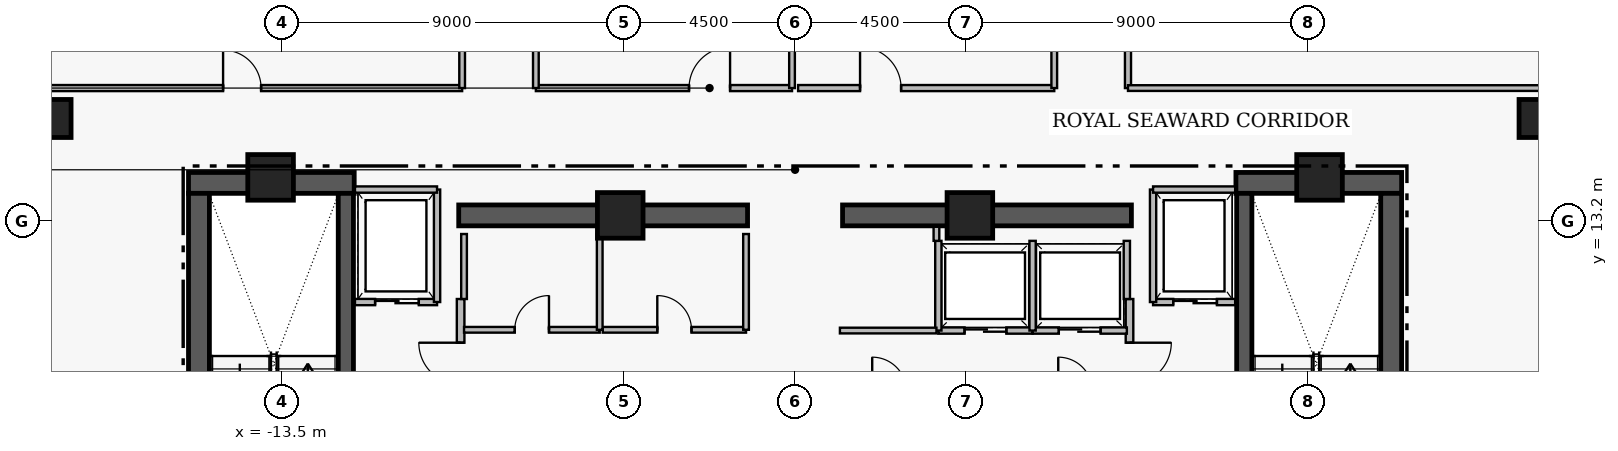
"""IFC4 building model, lengths in metres.
Left out: names, types, materials, properties, quantities, classifications, styles, units other than length and angle.
Written with IfcOpenShell. Run it as: python <this file> out.ifc"""

import sys

from ifc_helpers import new_model, si_unit, direction, frame, frame_2d, origin, origin_2d, place, context, subcontext, project, spatial, rectangle, extrude, element, fill, save


model = new_model("IFC4")
c1 = context("Model", 3, precision=1e-05, world=origin(), true_north=direction((0.0, 1.0)))
c2 = subcontext(c1, "Body", "Model", "MODEL_VIEW")
j1 = project(units=[si_unit("LENGTHUNIT", "METRE"), si_unit("PLANEANGLEUNIT", "RADIAN")], contexts=[c1])
p1 = place(None, origin())
s1 = spatial("IfcSite", under=j1, at=p1, CompositionType="ELEMENT")
p2 = place(p1, origin())
s2 = spatial("IfcBuilding", under=s1, at=p2, CompositionType="ELEMENT")
p3 = place(p2, frame((0.0, 0.0, 254.45)))
s3 = spatial("IfcBuildingStorey", under=s2, at=p3, CompositionType="ELEMENT", Elevation=254.45)
for number, where, z_axis, x_axis in (
    (1, (-15.96, 14.205, 0.0), (0.0, 0.0, 1.0), (1.0, 0.0, 0.0)),
    (2, (11.6, 14.205, 0.0), (0.0, 0.0, 1.0), (1.0, 0.0, 0.0)),
):
    element("IfcWall", number, at=place(p3, frame(where, z_axis=z_axis, x_axis=x_axis)), inside=s3, PredefinedType="SHEAR", context=c2, shape_type="SweptSolid", body=[
        extrude(rectangle(XDim=4.36, YDim=0.55, at=frame_2d((2.18, 0.0))), origin(), (0.0, 0.0, 1.0), 3.51),
    ])
for number, where, z_axis, x_axis in (
    (3, (-15.685, 4.97, 0.0), (0.0, 0.0, 1.0), (0.0, 1.0, 0.0)),
    (4, (15.685, 4.97, 0.0), (0.0, 0.0, 1.0), (0.0, 1.0, 0.0)),
):
    element("IfcWall", number, at=place(p3, frame(where, z_axis=z_axis, x_axis=x_axis)), inside=s3, PredefinedType="SHEAR", context=c2, shape_type="SweptSolid", body=[
        extrude(rectangle(XDim=8.96, YDim=0.55, at=frame_2d((4.48, 0.0))), origin(), (0.0, 0.0, 1.0), 3.51),
    ])
for number, where, z_axis, x_axis in (
    (5, (-8.85, 13.35, 0.0), (0.0, 0.0, 1.0), (1.0, 0.0, 0.0)),
    (6, (1.25, 13.35, 0.0), (0.0, 0.0, 1.0), (1.0, 0.0, 0.0)),
):
    element("IfcWall", number, at=place(p3, frame(where, z_axis=z_axis, x_axis=x_axis)), inside=s3, PredefinedType="SHEAR", context=c2, shape_type="SweptSolid", body=[
        extrude(rectangle(XDim=7.6, YDim=0.55, at=frame_2d((3.8, 0.0))), origin(), (0.0, 0.0, 1.0), 3.48),
    ])
p4 = place(p3, frame((-11.82, 4.97, 0.0), z_axis=(0.0, 0.0, 1.0), x_axis=(0.0, 1.0, 0.0)))
e7 = element("IfcWall", 7, at=p4, inside=s3, PredefinedType="SHEAR", context=c2, shape_type="SweptSolid", body=[
    extrude(rectangle(XDim=8.96, YDim=0.4, at=frame_2d((4.48, 0.0))), origin(), (0.0, 0.0, 1.0), 3.51),
])
p5 = place(p4, frame((0.31, 0.0, 0.0)))
e8 = element("IfcOpeningElement", 8, at=p5, cuts=e7, PredefinedType="OPENING", context=c2, shape_type="SweptSolid", body=[
    extrude(rectangle(XDim=1.12, YDim=2.22, at=frame_2d((0.56, 1.11))), frame((0.0, 0.21, 0.0), z_axis=(0.0, -1.0, 0.0), x_axis=(1.0, 0.0, 0.0)), (0.0, 0.0, 1.0), 0.42),
])
p6 = place(p3, frame((11.82, 13.93, 0.0), z_axis=(0.0, 0.0, 1.0), x_axis=(0.0, -1.0, 0.0)))
e9 = element("IfcWall", 9, at=p6, inside=s3, PredefinedType="SHEAR", context=c2, shape_type="SweptSolid", body=[
    extrude(rectangle(XDim=8.96, YDim=0.4, at=frame_2d((4.48, 0.0))), origin(), (0.0, 0.0, 1.0), 3.51),
])
p7 = place(p6, frame((7.53, 0.0, 0.0)))
e10 = element("IfcOpeningElement", 10, at=p7, cuts=e9, PredefinedType="OPENING", context=c2, shape_type="SweptSolid", body=[
    extrude(rectangle(XDim=1.12, YDim=2.22, at=frame_2d((0.56, 1.11))), frame((0.0, 0.21, 0.0), z_axis=(0.0, -1.0, 0.0), x_axis=(1.0, 0.0, 0.0)), (0.0, 0.0, 1.0), 0.42),
])
for number, where, z_axis, x_axis in (
    (11, (-13.8, 14.35, 0.0), (0.0, 0.0, 1.0), (1.0, 0.0, 0.0)),
    (12, (-4.6, 13.35, 0.0), (0.0, 0.0, 1.0), (1.0, 0.0, 0.0)),
    (13, (4.6, 13.35, 0.0), (0.0, 0.0, 1.0), (1.0, 0.0, 0.0)),
    (14, (13.8, 14.35, 0.0), (0.0, 0.0, 1.0), (1.0, 0.0, 0.0)),
):
    element("IfcColumn", number, at=place(p3, frame(where, z_axis=z_axis, x_axis=x_axis)), inside=s3, PredefinedType="COLUMN", context=c2, shape_type="SweptSolid", body=[
        extrude(rectangle(XDim=1.2, YDim=1.2, at=origin_2d()), origin(), (0.0, 0.0, 1.0), 3.7),
    ])
for number, where, z_axis, x_axis in (
    (15, (-19.55, 15.9, 0.0), (0.0, 0.0, 1.0), (1.0, 0.0, 0.0)),
    (16, (19.55, 15.9, 0.0), (0.0, 0.0, 1.0), (1.0, 0.0, 0.0)),
):
    element("IfcColumn", number, at=place(p3, frame(where, z_axis=z_axis, x_axis=x_axis)), inside=s3, PredefinedType="COLUMN", context=c2, shape_type="SweptSolid", body=[
        extrude(rectangle(XDim=1.0, YDim=1.0, at=origin_2d()), origin(), (0.0, 0.0, 1.0), 3.7),
    ])
p8 = place(p3, frame((-8.8, 5.05, 0.0), z_axis=(0.0, 0.0, 1.0), x_axis=(0.0, 1.0, 0.0)))
e17 = element("IfcWall", 17, at=p8, inside=s3, PredefinedType="PARTITIONING", context=c2, shape_type="SweptSolid", body=[
    extrude(rectangle(XDim=6.1, YDim=0.2, at=frame_2d((3.05, 0.0))), origin(), (0.0, 0.0, 1.0), 3.48),
])
p9 = place(p8, frame((0.25, 0.0, 0.0)))
e18 = element("IfcOpeningElement", 18, at=p9, cuts=e17, PredefinedType="OPENING", context=c2, shape_type="SweptSolid", body=[
    extrude(rectangle(XDim=1.1, YDim=2.2, at=frame_2d((0.55, 1.1))), frame((0.0, 0.11, 0.0), z_axis=(0.0, -1.0, 0.0), x_axis=(1.0, 0.0, 0.0)), (0.0, 0.0, 1.0), 0.22),
])
p10 = place(p8, frame((3.85, 0.0, 0.0)))
e19 = element("IfcOpeningElement", 19, at=p10, cuts=e17, PredefinedType="OPENING", context=c2, shape_type="SweptSolid", body=[
    extrude(rectangle(XDim=1.1, YDim=2.2, at=frame_2d((0.55, 1.1))), frame((0.0, 0.11, 0.0), z_axis=(0.0, -1.0, 0.0), x_axis=(1.0, 0.0, 0.0)), (0.0, 0.0, 1.0), 0.22),
])
p11 = place(p3, frame((8.8, 11.15, 0.0), z_axis=(0.0, 0.0, 1.0), x_axis=(0.0, -1.0, 0.0)))
e20 = element("IfcWall", 20, at=p11, inside=s3, PredefinedType="PARTITIONING", context=c2, shape_type="SweptSolid", body=[
    extrude(rectangle(XDim=6.1, YDim=0.2, at=frame_2d((3.05, 0.0))), origin(), (0.0, 0.0, 1.0), 3.48),
])
p12 = place(p11, frame((1.15, 0.0, 0.0)))
e21 = element("IfcOpeningElement", 21, at=p12, cuts=e20, PredefinedType="OPENING", context=c2, shape_type="SweptSolid", body=[
    extrude(rectangle(XDim=1.1, YDim=2.2, at=frame_2d((0.55, 1.1))), frame((0.0, 0.11, 0.0), z_axis=(0.0, -1.0, 0.0), x_axis=(1.0, 0.0, 0.0)), (0.0, 0.0, 1.0), 0.22),
])
p13 = place(p11, frame((4.75, 0.0, 0.0)))
e22 = element("IfcOpeningElement", 22, at=p13, cuts=e20, PredefinedType="OPENING", context=c2, shape_type="SweptSolid", body=[
    extrude(rectangle(XDim=1.1, YDim=2.2, at=frame_2d((0.55, 1.1))), frame((0.0, 0.11, 0.0), z_axis=(0.0, -1.0, 0.0), x_axis=(1.0, 0.0, 0.0)), (0.0, 0.0, 1.0), 0.22),
])
p14 = place(p3, frame((-11.58, 11.07, 0.0), z_axis=(0.0, 0.0, 1.0), x_axis=(1.0, 0.0, 0.0)))
e23 = element("IfcWall", 23, at=p14, inside=s3, PredefinedType="PARTITIONING", context=c2, shape_type="SweptSolid", body=[
    extrude(rectangle(XDim=2.16, YDim=0.165, at=frame_2d((1.08, 0.0))), origin(), (0.0, 0.0, 1.0), 3.48),
])
p15 = place(p14, frame((0.53, 0.0, 0.0)))
e24 = element("IfcOpeningElement", 24, at=p15, cuts=e23, PredefinedType="OPENING", context=c2, shape_type="SweptSolid", body=[
    extrude(rectangle(XDim=1.15, YDim=2.25, at=frame_2d((0.575, 1.125))), frame((0.0, 0.093, 0.0), z_axis=(0.0, -1.0, 0.0), x_axis=(1.0, 0.0, 0.0)), (0.0, 0.0, 1.0), 0.185),
])
p16 = place(p3, frame((9.42, 11.07, 0.0), z_axis=(0.0, 0.0, 1.0), x_axis=(1.0, 0.0, 0.0)))
e25 = element("IfcWall", 25, at=p16, inside=s3, PredefinedType="PARTITIONING", context=c2, shape_type="SweptSolid", body=[
    extrude(rectangle(XDim=2.16, YDim=0.165, at=frame_2d((1.08, 0.0))), origin(), (0.0, 0.0, 1.0), 3.48),
])
p17 = place(p16, frame((0.53, 0.0, 0.0)))
e26 = element("IfcOpeningElement", 26, at=p17, cuts=e25, PredefinedType="OPENING", context=c2, shape_type="SweptSolid", body=[
    extrude(rectangle(XDim=1.15, YDim=2.25, at=frame_2d((0.575, 1.125))), frame((0.0, 0.093, 0.0), z_axis=(0.0, -1.0, 0.0), x_axis=(1.0, 0.0, 0.0)), (0.0, 0.0, 1.0), 0.185),
])
p18 = place(p3, frame((3.77, 10.32, 0.0), z_axis=(0.0, 0.0, 1.0), x_axis=(1.0, 0.0, 0.0)))
e27 = element("IfcWall", 27, at=p18, inside=s3, PredefinedType="PARTITIONING", context=c2, shape_type="SweptSolid", body=[
    extrude(rectangle(XDim=2.48, YDim=0.165, at=frame_2d((1.24, 0.0))), origin(), (0.0, 0.0, 1.0), 3.48),
])
p19 = place(p18, frame((0.69, 0.0, 0.0)))
e28 = element("IfcOpeningElement", 28, at=p19, cuts=e27, PredefinedType="OPENING", context=c2, shape_type="SweptSolid", body=[
    extrude(rectangle(XDim=1.1, YDim=2.25, at=frame_2d((0.55, 1.125))), frame((0.0, 0.093, 0.0), z_axis=(0.0, -1.0, 0.0), x_axis=(1.0, 0.0, 0.0)), (0.0, 0.0, 1.0), 0.185),
])
p20 = place(p3, frame((6.25, 10.32, 0.0), z_axis=(0.0, 0.0, 1.0), x_axis=(1.0, 0.0, 0.0)))
e29 = element("IfcWall", 29, at=p20, inside=s3, PredefinedType="PARTITIONING", context=c2, shape_type="SweptSolid", body=[
    extrude(rectangle(XDim=2.48, YDim=0.165, at=frame_2d((1.24, 0.0))), origin(), (0.0, 0.0, 1.0), 3.48),
])
p21 = place(p20, frame((0.69, 0.0, 0.0)))
e30 = element("IfcOpeningElement", 30, at=p21, cuts=e29, PredefinedType="OPENING", context=c2, shape_type="SweptSolid", body=[
    extrude(rectangle(XDim=1.1, YDim=2.25, at=frame_2d((0.55, 1.125))), frame((0.0, 0.093, 0.0), z_axis=(0.0, -1.0, 0.0), x_axis=(1.0, 0.0, 0.0)), (0.0, 0.0, 1.0), 0.185),
])
p22 = place(p3, frame((-8.71, 10.34, 0.0), z_axis=(0.0, 0.0, 1.0), x_axis=(1.0, 0.0, 0.0)))
e31 = element("IfcWall", 31, at=p22, inside=s3, PredefinedType="PARTITIONING", context=c2, shape_type="SweptSolid", body=[
    extrude(rectangle(XDim=3.57, YDim=0.15, at=frame_2d((1.785, 0.0))), origin(), (0.0, 0.0, 1.0), 3.48),
])
p23 = place(p22, frame((1.335, 0.0, 0.0)))
e32 = element("IfcOpeningElement", 32, at=p23, cuts=e31, PredefinedType="OPENING", context=c2, shape_type="SweptSolid", body=[
    extrude(rectangle(XDim=0.9, YDim=2.15, at=frame_2d((0.45, 1.075))), frame((0.0, 0.085, 0.0), z_axis=(0.0, -1.0, 0.0), x_axis=(1.0, 0.0, 0.0)), (0.0, 0.0, 1.0), 0.17),
])
p24 = place(p3, frame((-5.06, 10.34, 0.0), z_axis=(0.0, 0.0, 1.0), x_axis=(1.0, 0.0, 0.0)))
e33 = element("IfcWall", 33, at=p24, inside=s3, PredefinedType="PARTITIONING", context=c2, shape_type="SweptSolid", body=[
    extrude(rectangle(XDim=3.77, YDim=0.15, at=frame_2d((1.885, 0.0))), origin(), (0.0, 0.0, 1.0), 3.48),
])
p25 = place(p24, frame((1.435, 0.0, 0.0)))
e34 = element("IfcOpeningElement", 34, at=p25, cuts=e33, PredefinedType="OPENING", context=c2, shape_type="SweptSolid", body=[
    extrude(rectangle(XDim=0.9, YDim=2.15, at=frame_2d((0.45, 1.075))), frame((0.0, 0.085, 0.0), z_axis=(0.0, -1.0, 0.0), x_axis=(1.0, 0.0, 0.0)), (0.0, 0.0, 1.0), 0.17),
])
p26 = place(p3, frame((-6.82, 16.7, 0.0), z_axis=(0.0, 0.0, 1.0), x_axis=(1.0, 0.0, 0.0)))
e35 = element("IfcWall", 35, at=p26, inside=s3, PredefinedType="PARTITIONING", context=c2, shape_type="SweptSolid", body=[
    extrude(rectangle(XDim=6.74, YDim=0.16, at=frame_2d((3.37, 0.0))), origin(), (0.0, 0.0, 1.0), 3.076),
])
p27 = place(p26, frame((4.03, 0.0, 0.0)))
e36 = element("IfcOpeningElement", 36, at=p27, cuts=e35, PredefinedType="OPENING", context=c2, shape_type="SweptSolid", body=[
    extrude(rectangle(XDim=1.08, YDim=2.18, at=frame_2d((0.54, 1.09))), frame((0.0, 0.09, 0.0), z_axis=(0.0, -1.0, 0.0), x_axis=(1.0, 0.0, 0.0)), (0.0, 0.0, 1.0), 0.18),
])
p28 = place(p3, frame((0.08, 16.7, 0.0), z_axis=(0.0, 0.0, 1.0), x_axis=(1.0, 0.0, 0.0)))
e37 = element("IfcWall", 37, at=p28, inside=s3, PredefinedType="PARTITIONING", context=c2, shape_type="SweptSolid", body=[
    extrude(rectangle(XDim=6.74, YDim=0.16, at=frame_2d((3.37, 0.0))), origin(), (0.0, 0.0, 1.0), 3.076),
])
p29 = place(p28, frame((1.63, 0.0, 0.0)))
e38 = element("IfcOpeningElement", 38, at=p29, cuts=e37, PredefinedType="OPENING", context=c2, shape_type="SweptSolid", body=[
    extrude(rectangle(XDim=1.08, YDim=2.18, at=frame_2d((0.54, 1.09))), frame((0.0, 0.09, 0.0), z_axis=(0.0, -1.0, 0.0), x_axis=(1.0, 0.0, 0.0)), (0.0, 0.0, 1.0), 0.18),
])
p30 = place(p3, frame((-22.64, 16.7, 0.0), z_axis=(0.0, 0.0, 1.0), x_axis=(1.0, 0.0, 0.0)))
e39 = element("IfcWall", 39, at=p30, inside=s3, PredefinedType="PARTITIONING", context=c2, shape_type="SweptSolid", body=[
    extrude(rectangle(XDim=13.88, YDim=0.16, at=frame_2d((6.94, 0.0))), origin(), (0.0, 0.0, 1.0), 3.076),
])
p31 = place(p30, frame((7.59, 0.0, 0.0)))
e40 = element("IfcOpeningElement", 40, at=p31, cuts=e39, PredefinedType="OPENING", context=c2, shape_type="SweptSolid", body=[
    extrude(rectangle(XDim=1.0, YDim=2.15, at=frame_2d((0.5, 1.075))), frame((0.0, 0.09, 0.0), z_axis=(0.0, -1.0, 0.0), x_axis=(1.0, 0.0, 0.0)), (0.0, 0.0, 1.0), 0.18),
])
p32 = place(p3, frame((8.76, 16.7, 0.0), z_axis=(0.0, 0.0, 1.0), x_axis=(0.0, 1.0, 0.0)))
e41 = element("IfcWall", 41, at=p32, inside=s3, PredefinedType="PARTITIONING", context=c2, shape_type="SweptSolid", body=[
    extrude(rectangle(XDim=6.95, YDim=0.16, at=frame_2d((3.475, 0.0))), origin(), (0.0, 0.0, 1.0), 3.48),
])
p33 = place(p32, frame((2.935, 0.0, 0.0)))
e42 = element("IfcOpeningElement", 42, at=p33, cuts=e41, PredefinedType="OPENING", context=c2, shape_type="SweptSolid", body=[
    extrude(rectangle(XDim=1.08, YDim=2.18, at=frame_2d((0.54, 1.09))), frame((0.0, 0.09, 0.0), z_axis=(0.0, -1.0, 0.0), x_axis=(1.0, 0.0, 0.0)), (0.0, 0.0, 1.0), 0.18),
])
p34 = place(p3, frame((-9.42, 11.07, 0.0), z_axis=(0.0, 0.0, 1.0), x_axis=(0.0, 1.0, 0.0)))
e43 = element("IfcWall", 43, at=p34, inside=s3, PredefinedType="PARTITIONING", context=c2, shape_type="SweptSolid", body=[
    extrude(rectangle(XDim=2.96, YDim=0.165, at=frame_2d((1.48, 0.0))), origin(), (0.0, 0.0, 1.0), 3.48),
])
p35 = place(p3, frame((-11.58, 14.03, 0.0), z_axis=(0.0, 0.0, 1.0), x_axis=(1.0, 0.0, 0.0)))
e44 = element("IfcWall", 44, at=p35, inside=s3, PredefinedType="PARTITIONING", context=c2, shape_type="SweptSolid", body=[
    extrude(rectangle(XDim=2.16, YDim=0.165, at=frame_2d((1.08, 0.0))), origin(), (0.0, 0.0, 1.0), 3.48),
])
p36 = place(p3, frame((9.42, 11.07, 0.0), z_axis=(0.0, 0.0, 1.0), x_axis=(0.0, 1.0, 0.0)))
e45 = element("IfcWall", 45, at=p36, inside=s3, PredefinedType="PARTITIONING", context=c2, shape_type="SweptSolid", body=[
    extrude(rectangle(XDim=2.96, YDim=0.165, at=frame_2d((1.48, 0.0))), origin(), (0.0, 0.0, 1.0), 3.48),
])
p37 = place(p3, frame((9.42, 14.03, 0.0), z_axis=(0.0, 0.0, 1.0), x_axis=(1.0, 0.0, 0.0)))
e46 = element("IfcWall", 46, at=p37, inside=s3, PredefinedType="PARTITIONING", context=c2, shape_type="SweptSolid", body=[
    extrude(rectangle(XDim=2.16, YDim=0.165, at=frame_2d((1.08, 0.0))), origin(), (0.0, 0.0, 1.0), 3.48),
])
for number, where, z_axis, x_axis in (
    (47, (3.77, 10.32, 0.0), (0.0, 0.0, 1.0), (0.0, 1.0, 0.0)),
    (48, (6.25, 10.32, 0.0), (0.0, 0.0, 1.0), (0.0, 1.0, 0.0)),
):
    element("IfcWall", number, at=place(p3, frame(where, z_axis=z_axis, x_axis=x_axis)), inside=s3, PredefinedType="PARTITIONING", context=c2, shape_type="SweptSolid", body=[
        extrude(rectangle(XDim=2.36, YDim=0.165, at=frame_2d((1.18, 0.0))), origin(), (0.0, 0.0, 1.0), 3.48),
    ])
p38 = place(p3, frame((8.73, 11.15, 0.0), z_axis=(0.0, 0.0, 1.0), x_axis=(0.0, 1.0, 0.0)))
e49 = element("IfcWall", 49, at=p38, inside=s3, PredefinedType="PARTITIONING", context=c2, shape_type="SweptSolid", body=[
    extrude(rectangle(XDim=1.53, YDim=0.165, at=frame_2d((0.765, 0.0))), origin(), (0.0, 0.0, 1.0), 3.48),
])
p39 = place(p3, frame((-8.71, 11.15, 0.0), z_axis=(0.0, 0.0, 1.0), x_axis=(0.0, 1.0, 0.0)))
e50 = element("IfcWall", 50, at=p39, inside=s3, PredefinedType="PARTITIONING", context=c2, shape_type="SweptSolid", body=[
    extrude(rectangle(XDim=1.71, YDim=0.15, at=frame_2d((0.855, 0.0))), origin(), (0.0, 0.0, 1.0), 3.48),
])
for number, where, z_axis, x_axis in (
    (51, (-5.14, 10.34, 0.0), (0.0, 0.0, 1.0), (0.0, 1.0, 0.0)),
    (52, (-1.29, 10.34, 0.0), (0.0, 0.0, 1.0), (0.0, 1.0, 0.0)),
):
    element("IfcWall", number, at=place(p3, frame(where, z_axis=z_axis, x_axis=x_axis)), inside=s3, PredefinedType="PARTITIONING", context=c2, shape_type="SweptSolid", body=[
        extrude(rectangle(XDim=2.52, YDim=0.15, at=frame_2d((1.26, 0.0))), origin(), (0.0, 0.0, 1.0), 3.48),
    ])
p40 = place(p3, frame((1.18, 10.32, 0.0), z_axis=(0.0, 0.0, 1.0), x_axis=(1.0, 0.0, 0.0)))
e53 = element("IfcWall", 53, at=p40, inside=s3, PredefinedType="PARTITIONING", context=c2, shape_type="SweptSolid", body=[
    extrude(rectangle(XDim=2.54, YDim=0.15, at=frame_2d((1.27, 0.0))), origin(), (0.0, 0.0, 1.0), 3.48),
])
p41 = place(p3, frame((3.72, 12.68, 0.0), z_axis=(0.0, 0.0, 1.0), x_axis=(0.0, 1.0, 0.0)))
e54 = element("IfcWall", 54, at=p41, inside=s3, PredefinedType="PARTITIONING", context=c2, shape_type="SweptSolid", body=[
    extrude(rectangle(XDim=0.37, YDim=0.15, at=frame_2d((0.185, 0.0))), origin(), (0.0, 0.0, 1.0), 3.48),
])
for number, where, z_axis, x_axis in (
    (55, (-6.82, 16.7, 0.0), (0.0, 0.0, 1.0), (0.0, 1.0, 0.0)),
    (56, (-0.08, 16.7, 0.0), (0.0, 0.0, 1.0), (0.0, 1.0, 0.0)),
    (57, (6.82, 16.7, 0.0), (0.0, 0.0, 1.0), (0.0, 1.0, 0.0)),
):
    element("IfcWall", number, at=place(p3, frame(where, z_axis=z_axis, x_axis=x_axis)), inside=s3, PredefinedType="PARTITIONING", context=c2, shape_type="SweptSolid", body=[
        extrude(rectangle(XDim=10.22, YDim=0.15, at=frame_2d((5.11, 0.0))), origin(), (0.0, 0.0, 1.0), 3.48),
    ])
p42 = place(p3, frame((-8.76, 16.7, 0.0), z_axis=(0.0, 0.0, 1.0), x_axis=(0.0, 1.0, 0.0)))
e58 = element("IfcWall", 58, at=p42, inside=s3, PredefinedType="PARTITIONING", context=c2, shape_type="SweptSolid", body=[
    extrude(rectangle(XDim=12.68, YDim=0.15, at=frame_2d((6.34, 0.0))), origin(), (0.0, 0.0, 1.0), 3.48),
])
p43 = place(p3, frame((8.76, 16.7, 0.0), z_axis=(0.0, 0.0, 1.0), x_axis=(1.0, 0.0, 0.0)))
e59 = element("IfcWall", 59, at=p43, inside=s3, PredefinedType="PARTITIONING", context=c2, shape_type="SweptSolid", body=[
    extrude(rectangle(XDim=12.358, YDim=0.15, at=frame_2d((6.179, 0.0))), origin(), (0.0, 0.0, 1.0), 3.076),
])
p44 = place(p10, origin())
e60 = element("IfcDoor", 60, at=p44, inside=s3, OperationType="SINGLE_SWING_RIGHT", PredefinedType="DOOR", context=c2, shape_type="SweptSolid", body=[
    extrude(rectangle(XDim=1.1, YDim=2.2, at=frame_2d((0.55, 1.1))), frame((0.0, 0.025, 0.0), z_axis=(0.0, -1.0, 0.0), x_axis=(1.0, 0.0, 0.0)), (0.0, 0.0, 1.0), 0.05),
])
fill(e19, e60)
p45 = place(p12, origin())
e61 = element("IfcDoor", 61, at=p45, inside=s3, OperationType="SINGLE_SWING_LEFT", PredefinedType="DOOR", context=c2, shape_type="SweptSolid", body=[
    extrude(rectangle(XDim=1.1, YDim=2.2, at=frame_2d((0.55, 1.1))), frame((0.0, 0.025, 0.0), z_axis=(0.0, -1.0, 0.0), x_axis=(1.0, 0.0, 0.0)), (0.0, 0.0, 1.0), 0.05),
])
fill(e21, e61)
p46 = place(p15, origin())
e62 = element("IfcDoor", 62, at=p46, inside=s3, OperationType="SLIDING_TO_LEFT", PredefinedType="DOOR", context=c2, shape_type="SweptSolid", body=[
    extrude(rectangle(XDim=1.15, YDim=2.25, at=frame_2d((0.575, 1.125))), frame((0.0, 0.025, 0.0), z_axis=(0.0, -1.0, 0.0), x_axis=(1.0, 0.0, 0.0)), (0.0, 0.0, 1.0), 0.05),
])
fill(e24, e62)
p47 = place(p17, origin())
e63 = element("IfcDoor", 63, at=p47, inside=s3, OperationType="SLIDING_TO_LEFT", PredefinedType="DOOR", context=c2, shape_type="SweptSolid", body=[
    extrude(rectangle(XDim=1.15, YDim=2.25, at=frame_2d((0.575, 1.125))), frame((0.0, 0.025, 0.0), z_axis=(0.0, -1.0, 0.0), x_axis=(1.0, 0.0, 0.0)), (0.0, 0.0, 1.0), 0.05),
])
fill(e26, e63)
p48 = place(p19, origin())
e64 = element("IfcDoor", 64, at=p48, inside=s3, OperationType="SLIDING_TO_LEFT", PredefinedType="DOOR", context=c2, shape_type="SweptSolid", body=[
    extrude(rectangle(XDim=1.1, YDim=2.25, at=frame_2d((0.55, 1.125))), frame((0.0, 0.025, 0.0), z_axis=(0.0, -1.0, 0.0), x_axis=(1.0, 0.0, 0.0)), (0.0, 0.0, 1.0), 0.05),
])
fill(e28, e64)
p49 = place(p21, origin())
e65 = element("IfcDoor", 65, at=p49, inside=s3, OperationType="SLIDING_TO_LEFT", PredefinedType="DOOR", context=c2, shape_type="SweptSolid", body=[
    extrude(rectangle(XDim=1.1, YDim=2.25, at=frame_2d((0.55, 1.125))), frame((0.0, 0.025, 0.0), z_axis=(0.0, -1.0, 0.0), x_axis=(1.0, 0.0, 0.0)), (0.0, 0.0, 1.0), 0.05),
])
fill(e30, e65)
p50 = place(p23, origin())
e66 = element("IfcDoor", 66, at=p50, inside=s3, OperationType="SINGLE_SWING_RIGHT", PredefinedType="DOOR", context=c2, shape_type="SweptSolid", body=[
    extrude(rectangle(XDim=0.9, YDim=2.15, at=frame_2d((0.45, 1.075))), frame((0.0, 0.025, 0.0), z_axis=(0.0, -1.0, 0.0), x_axis=(1.0, 0.0, 0.0)), (0.0, 0.0, 1.0), 0.05),
])
fill(e32, e66)
p51 = place(p25, origin())
e67 = element("IfcDoor", 67, at=p51, inside=s3, OperationType="SINGLE_SWING_LEFT", PredefinedType="DOOR", context=c2, shape_type="SweptSolid", body=[
    extrude(rectangle(XDim=0.9, YDim=2.15, at=frame_2d((0.45, 1.075))), frame((0.0, 0.025, 0.0), z_axis=(0.0, -1.0, 0.0), x_axis=(1.0, 0.0, 0.0)), (0.0, 0.0, 1.0), 0.05),
])
fill(e34, e67)
p52 = place(p27, origin())
e68 = element("IfcDoor", 68, at=p52, inside=s3, OperationType="SINGLE_SWING_RIGHT", PredefinedType="DOOR", context=c2, shape_type="SweptSolid", body=[
    extrude(rectangle(XDim=1.08, YDim=2.18, at=frame_2d((0.54, 1.09))), frame((0.0, 0.025, 0.0), z_axis=(0.0, -1.0, 0.0), x_axis=(1.0, 0.0, 0.0)), (0.0, 0.0, 1.0), 0.05),
])
fill(e36, e68)
p53 = place(p29, origin())
e69 = element("IfcDoor", 69, at=p53, inside=s3, OperationType="SINGLE_SWING_LEFT", PredefinedType="DOOR", context=c2, shape_type="SweptSolid", body=[
    extrude(rectangle(XDim=1.08, YDim=2.18, at=frame_2d((0.54, 1.09))), frame((0.0, 0.025, 0.0), z_axis=(0.0, -1.0, 0.0), x_axis=(1.0, 0.0, 0.0)), (0.0, 0.0, 1.0), 0.05),
])
fill(e38, e69)
p54 = place(p31, origin())
e70 = element("IfcDoor", 70, at=p54, inside=s3, OperationType="SINGLE_SWING_LEFT", PredefinedType="DOOR", context=c2, shape_type="SweptSolid", body=[
    extrude(rectangle(XDim=1.0, YDim=2.15, at=frame_2d((0.5, 1.075))), frame((0.0, 0.025, 0.0), z_axis=(0.0, -1.0, 0.0), x_axis=(1.0, 0.0, 0.0)), (0.0, 0.0, 1.0), 0.05),
])
fill(e40, e70)
save(model, sys.argv[1])
